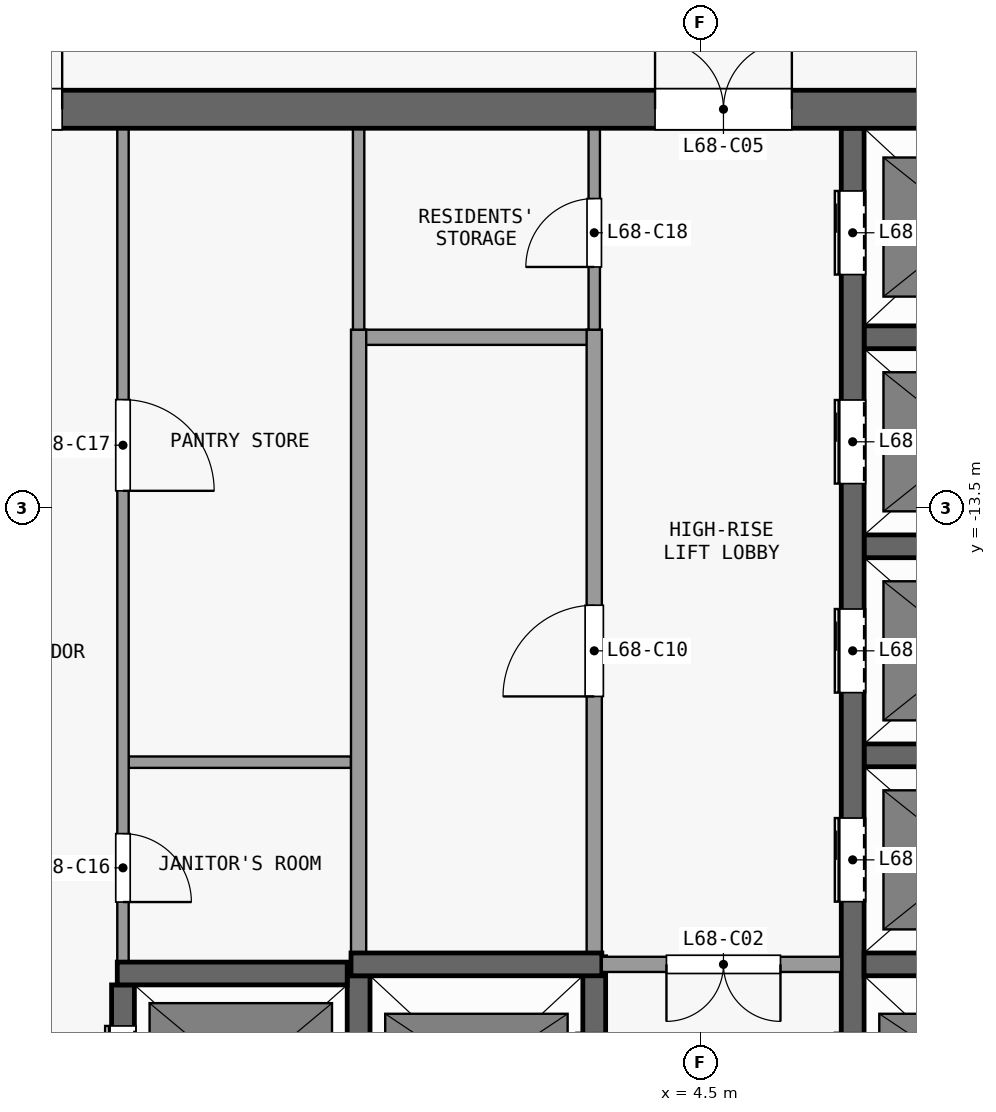
"""IFC4 building model, lengths in metres.
Left out: names, types, materials, properties, quantities, classifications, styles, units other than length and angle.
Written with IfcOpenShell. Run it as: python <this file> out.ifc"""

import sys

from ifc_helpers import new_model, si_unit, direction, frame, frame_2d, origin, place, context, subcontext, project, spatial, rectangle, extrude, element, fill, save


model = new_model("IFC4")
c1 = context("Model", 3, precision=1e-05, world=origin(), true_north=direction((0.0, 1.0)))
c2 = subcontext(c1, "Body", "Model", "MODEL_VIEW")
j1 = project(units=[si_unit("LENGTHUNIT", "METRE"), si_unit("PLANEANGLEUNIT", "RADIAN")], contexts=[c1])
p1 = place(None, origin())
s1 = spatial("IfcSite", under=j1, at=p1, CompositionType="ELEMENT")
p2 = place(p1, origin())
s2 = spatial("IfcBuilding", under=s1, at=p2, CompositionType="ELEMENT")
p3 = place(p2, frame((0.0, 0.0, 269.9)))
s3 = spatial("IfcBuildingStorey", under=s2, at=p3, CompositionType="ELEMENT", Elevation=269.9)
p4 = place(p3, frame((-13.1, -8.25, 0.0), z_axis=(0.0, 0.0, 1.0), x_axis=(1.0, 0.0, 0.0)))
e1 = element("IfcWall", 1, at=p4, inside=s3, PredefinedType="SHEAR", context=c2, shape_type="SweptSolid", body=[
    extrude(rectangle(XDim=26.2, YDim=0.5, at=frame_2d((13.1, 0.0))), origin(), (0.0, 0.0, 1.0), 3.3),
])
p5 = place(p4, frame((7.4, 0.0, 0.0)))
e2 = element("IfcOpeningElement", 2, at=p5, cuts=e1, PredefinedType="OPENING", context=c2, shape_type="SweptSolid", body=[
    extrude(rectangle(XDim=1.8, YDim=2.1, at=frame_2d((0.9, 1.05))), frame((0.0, 0.26, 0.0), z_axis=(0.0, -1.0, 0.0), x_axis=(1.0, 0.0, 0.0)), (0.0, 0.0, 1.0), 0.52),
])
p6 = place(p4, frame((17.0, 0.0, 0.0)))
e3 = element("IfcOpeningElement", 3, at=p6, cuts=e1, PredefinedType="OPENING", context=c2, shape_type="SweptSolid", body=[
    extrude(rectangle(XDim=1.8, YDim=2.1, at=frame_2d((0.9, 1.05))), frame((0.0, 0.26, 0.0), z_axis=(0.0, -1.0, 0.0), x_axis=(1.0, 0.0, 0.0)), (0.0, 0.0, 1.0), 0.52),
])
p7 = place(p4, frame((2.325, 0.0, 0.0)))
e4 = element("IfcOpeningElement", 4, at=p7, cuts=e1, PredefinedType="OPENING", context=c2, shape_type="SweptSolid", body=[
    extrude(rectangle(XDim=0.9, YDim=2.1, at=frame_2d((0.45, 1.05))), frame((0.0, 0.26, 0.0), z_axis=(0.0, -1.0, 0.0), x_axis=(1.0, 0.0, 0.0)), (0.0, 0.0, 1.0), 0.52),
])
p8 = place(p4, frame((22.975, 0.0, 0.0)))
e5 = element("IfcOpeningElement", 5, at=p8, cuts=e1, PredefinedType="OPENING", context=c2, shape_type="SweptSolid", body=[
    extrude(rectangle(XDim=0.9, YDim=2.1, at=frame_2d((0.45, 1.05))), frame((0.0, 0.26, 0.0), z_axis=(0.0, -1.0, 0.0), x_axis=(1.0, 0.0, 0.0)), (0.0, 0.0, 1.0), 0.52),
])
p9 = place(p3, frame((-3.175, -19.62, 0.0), z_axis=(0.0, 0.0, 1.0), x_axis=(1.0, 0.0, 0.0)))
e6 = element("IfcWall", 6, at=p9, inside=s3, PredefinedType="SHEAR", context=c2, shape_type="SweptSolid", body=[
    extrude(rectangle(XDim=3.025, YDim=0.3, at=frame_2d((1.513, 0.0))), origin(), (0.0, 0.0, 1.0), 3.3),
])
p10 = place(p3, frame((-0.1, -19.5, 0.0), z_axis=(0.0, 0.0, 1.0), x_axis=(1.0, 0.0, 0.0)))
e7 = element("IfcWall", 7, at=p10, inside=s3, PredefinedType="SHEAR", context=c2, shape_type="SweptSolid", body=[
    extrude(rectangle(XDim=3.3, YDim=0.3, at=frame_2d((1.65, 0.0))), origin(), (0.0, 0.0, 1.0), 3.3),
])
p11 = place(p3, frame((6.35, -19.5, 0.0), z_axis=(0.0, 0.0, 1.0), x_axis=(-1.0, 0.0, 0.0)))
e8 = element("IfcWall", 8, at=p11, inside=s3, PredefinedType="PARTITIONING", context=c2, shape_type="SweptSolid", body=[
    extrude(rectangle(XDim=3.15, YDim=0.2, at=frame_2d((1.575, 0.0))), origin(), (0.0, 0.0, 1.0), 3.3),
])
p12 = place(p11, frame((0.8, 0.0, 0.0)))
e9 = element("IfcOpeningElement", 9, at=p12, cuts=e8, PredefinedType="OPENING", context=c2, shape_type="SweptSolid", body=[
    extrude(rectangle(XDim=1.5, YDim=2.1, at=frame_2d((0.75, 1.05))), frame((0.0, 0.11, 0.0), z_axis=(0.0, -1.0, 0.0), x_axis=(1.0, 0.0, 0.0)), (0.0, 0.0, 1.0), 0.22),
])
p13 = place(p3, frame((6.65, -19.5, 0.0), z_axis=(0.0, 0.0, 1.0), x_axis=(1.0, 0.0, 0.0)))
e10 = element("IfcWall", 10, at=p13, inside=s3, PredefinedType="SHEAR", context=c2, shape_type="SweptSolid", body=[
    extrude(rectangle(XDim=2.8, YDim=0.3, at=frame_2d((1.4, 0.0))), origin(), (0.0, 0.0, 1.0), 3.3),
])
p14 = place(p3, frame((-3.025, -16.84, 0.0), z_axis=(0.0, 0.0, 1.0), x_axis=(1.0, 0.0, 0.0)))
e11 = element("IfcWall", 11, at=p14, inside=s3, PredefinedType="PARTITIONING", context=c2, shape_type="SweptSolid", body=[
    extrude(rectangle(XDim=2.925, YDim=0.15, at=frame_2d((1.462, 0.0))), origin(), (0.0, 0.0, 1.0), 3.3),
])
for number, where, z_axis, x_axis in (
    (12, (6.65, -16.75, 0.0), (0.0, 0.0, 1.0), (1.0, 0.0, 0.0)),
    (13, (6.65, -14.0, 0.0), (0.0, 0.0, 1.0), (1.0, 0.0, 0.0)),
):
    element("IfcWall", number, at=place(p3, frame(where, z_axis=z_axis, x_axis=x_axis)), inside=s3, PredefinedType="SHEAR", context=c2, shape_type="SweptSolid", body=[
        extrude(rectangle(XDim=2.8, YDim=0.3, at=frame_2d((1.4, 0.0))), origin(), (0.0, 0.0, 1.0), 3.3),
    ])
p15 = place(p3, frame((-0.075, -11.25, 0.0), z_axis=(0.0, 0.0, 1.0), x_axis=(1.0, 0.0, 0.0)))
e14 = element("IfcWall", 14, at=p15, inside=s3, PredefinedType="PARTITIONING", context=c2, shape_type="SweptSolid", body=[
    extrude(rectangle(XDim=3.25, YDim=0.2, at=frame_2d((1.625, 0.0))), origin(), (0.0, 0.0, 1.0), 3.3),
])
p16 = place(p3, frame((6.65, -11.25, 0.0), z_axis=(0.0, 0.0, 1.0), x_axis=(1.0, 0.0, 0.0)))
e15 = element("IfcWall", 15, at=p16, inside=s3, PredefinedType="SHEAR", context=c2, shape_type="SweptSolid", body=[
    extrude(rectangle(XDim=2.8, YDim=0.3, at=frame_2d((1.4, 0.0))), origin(), (0.0, 0.0, 1.0), 3.3),
])
p17 = place(p3, frame((-3.1, -22.25, 0.0), z_axis=(0.0, 0.0, 1.0), x_axis=(0.0, 1.0, 0.0)))
e16 = element("IfcWall", 16, at=p17, inside=s3, PredefinedType="SHEAR", context=c2, shape_type="SweptSolid", body=[
    extrude(rectangle(XDim=2.48, YDim=0.3, at=frame_2d((1.24, 0.0))), origin(), (0.0, 0.0, 1.0), 3.3),
])
p18 = place(p17, frame((0.54, 0.0, 0.0)))
e17 = element("IfcOpeningElement", 17, at=p18, cuts=e16, PredefinedType="OPENING", context=c2, shape_type="SweptSolid", body=[
    extrude(rectangle(XDim=1.4, YDim=2.1, at=frame_2d((0.7, 1.05))), frame((0.0, 0.16, 0.0), z_axis=(0.0, -1.0, 0.0), x_axis=(1.0, 0.0, 0.0)), (0.0, 0.0, 1.0), 0.32),
])
p19 = place(p3, frame((-3.1, -8.5, 0.0), z_axis=(0.0, 0.0, 1.0), x_axis=(0.0, -1.0, 0.0)))
e18 = element("IfcWall", 18, at=p19, inside=s3, PredefinedType="PARTITIONING", context=c2, shape_type="SweptSolid", body=[
    extrude(rectangle(XDim=10.97, YDim=0.15, at=frame_2d((5.485, 0.0))), origin(), (0.0, 0.0, 1.0), 3.3),
])
p20 = place(p19, frame((9.28, 0.0, 0.0)))
e19 = element("IfcOpeningElement", 19, at=p20, cuts=e18, PredefinedType="OPENING", context=c2, shape_type="SweptSolid", body=[
    extrude(rectangle(XDim=0.9, YDim=2.1, at=frame_2d((0.45, 1.05))), frame((0.0, 0.085, 0.0), z_axis=(0.0, -1.0, 0.0), x_axis=(1.0, 0.0, 0.0)), (0.0, 0.0, 1.0), 0.17),
])
p21 = place(p19, frame((3.57, 0.0, 0.0)))
e20 = element("IfcOpeningElement", 20, at=p21, cuts=e18, PredefinedType="OPENING", context=c2, shape_type="SweptSolid", body=[
    extrude(rectangle(XDim=1.2, YDim=2.1, at=frame_2d((0.6, 1.05))), frame((0.0, 0.085, 0.0), z_axis=(0.0, -1.0, 0.0), x_axis=(1.0, 0.0, 0.0)), (0.0, 0.0, 1.0), 0.17),
])
p22 = place(p3, frame((0.0, -22.25, 0.0), z_axis=(0.0, 0.0, 1.0), x_axis=(0.0, 1.0, 0.0)))
e21 = element("IfcWall", 21, at=p22, inside=s3, PredefinedType="SHEAR", context=c2, shape_type="SweptSolid", body=[
    extrude(rectangle(XDim=2.6, YDim=0.3, at=frame_2d((1.3, 0.0))), origin(), (0.0, 0.0, 1.0), 3.3),
])
p23 = place(p3, frame((0.0, -19.35, 0.0), z_axis=(0.0, 0.0, 1.0), x_axis=(0.0, 1.0, 0.0)))
e22 = element("IfcWall", 22, at=p23, inside=s3, PredefinedType="PARTITIONING", context=c2, shape_type="SweptSolid", body=[
    extrude(rectangle(XDim=8.2, YDim=0.2, at=frame_2d((4.1, 0.0))), origin(), (0.0, 0.0, 1.0), 3.3),
])
p24 = place(p3, frame((0.0, -11.15, 0.0), z_axis=(0.0, 0.0, 1.0), x_axis=(0.0, 1.0, 0.0)))
e23 = element("IfcWall", 23, at=p24, inside=s3, PredefinedType="PARTITIONING", context=c2, shape_type="SweptSolid", body=[
    extrude(rectangle(XDim=2.65, YDim=0.15, at=frame_2d((1.325, 0.0))), origin(), (0.0, 0.0, 1.0), 3.3),
])
p25 = place(p3, frame((3.1, -22.25, 0.0), z_axis=(0.0, 0.0, 1.0), x_axis=(0.0, 1.0, 0.0)))
e24 = element("IfcWall", 24, at=p25, inside=s3, PredefinedType="SHEAR", context=c2, shape_type="SweptSolid", body=[
    extrude(rectangle(XDim=2.85, YDim=0.3, at=frame_2d((1.425, 0.0))), origin(), (0.0, 0.0, 1.0), 3.3),
])
p26 = place(p25, frame((0.75, 0.0, 0.0)))
e25 = element("IfcOpeningElement", 25, at=p26, cuts=e24, PredefinedType="OPENING", context=c2, shape_type="SweptSolid", body=[
    extrude(rectangle(XDim=1.1, YDim=2.1, at=frame_2d((0.55, 1.05))), frame((0.0, 0.16, 0.0), z_axis=(0.0, -1.0, 0.0), x_axis=(1.0, 0.0, 0.0)), (0.0, 0.0, 1.0), 0.32),
])
p27 = place(p3, frame((3.1, -19.6, 0.0), z_axis=(0.0, 0.0, 1.0), x_axis=(0.0, 1.0, 0.0)))
e26 = element("IfcWall", 26, at=p27, inside=s3, PredefinedType="PARTITIONING", context=c2, shape_type="SweptSolid", body=[
    extrude(rectangle(XDim=8.45, YDim=0.2, at=frame_2d((4.225, 0.0))), origin(), (0.0, 0.0, 1.0), 3.3),
])
p28 = place(p27, frame((3.625, 0.0, 0.0)))
e27 = element("IfcOpeningElement", 27, at=p28, cuts=e26, PredefinedType="OPENING", context=c2, shape_type="SweptSolid", body=[
    extrude(rectangle(XDim=1.2, YDim=2.1, at=frame_2d((0.6, 1.05))), frame((0.0, 0.11, 0.0), z_axis=(0.0, -1.0, 0.0), x_axis=(1.0, 0.0, 0.0)), (0.0, 0.0, 1.0), 0.22),
])
p29 = place(p3, frame((3.1, -11.15, 0.0), z_axis=(0.0, 0.0, 1.0), x_axis=(0.0, 1.0, 0.0)))
e28 = element("IfcWall", 28, at=p29, inside=s3, PredefinedType="PARTITIONING", context=c2, shape_type="SweptSolid", body=[
    extrude(rectangle(XDim=2.65, YDim=0.15, at=frame_2d((1.325, 0.0))), origin(), (0.0, 0.0, 1.0), 3.3),
])
p30 = place(p29, frame((0.825, 0.0, 0.0)))
e29 = element("IfcOpeningElement", 29, at=p30, cuts=e28, PredefinedType="OPENING", context=c2, shape_type="SweptSolid", body=[
    extrude(rectangle(XDim=0.9, YDim=2.1, at=frame_2d((0.45, 1.05))), frame((0.0, 0.085, 0.0), z_axis=(0.0, -1.0, 0.0), x_axis=(1.0, 0.0, 0.0)), (0.0, 0.0, 1.0), 0.17),
])
p31 = place(p3, frame((6.5, -22.55, 0.0), z_axis=(0.0, 0.0, 1.0), x_axis=(0.0, 1.0, 0.0)))
e30 = element("IfcWall", 30, at=p31, inside=s3, PredefinedType="SHEAR", context=c2, shape_type="SweptSolid", body=[
    extrude(rectangle(XDim=14.05, YDim=0.3, at=frame_2d((7.025, 0.0))), origin(), (0.0, 0.0, 1.0), 3.3),
])
p32 = place(p31, frame((1.05, 0.0, 0.0)))
e31 = element("IfcOpeningElement", 31, at=p32, cuts=e30, PredefinedType="OPENING", context=c2, shape_type="SweptSolid", body=[
    extrude(rectangle(XDim=1.1, YDim=2.1, at=frame_2d((0.55, 1.05))), frame((0.0, 0.16, 0.0), z_axis=(0.0, -1.0, 0.0), x_axis=(1.0, 0.0, 0.0)), (0.0, 0.0, 1.0), 0.32),
])
p33 = place(p31, frame((3.875, 0.0, 0.0)))
e32 = element("IfcOpeningElement", 32, at=p33, cuts=e30, PredefinedType="OPENING", context=c2, shape_type="SweptSolid", body=[
    extrude(rectangle(XDim=1.1, YDim=2.1, at=frame_2d((0.55, 1.05))), frame((0.0, 0.16, 0.0), z_axis=(0.0, -1.0, 0.0), x_axis=(1.0, 0.0, 0.0)), (0.0, 0.0, 1.0), 0.32),
])
p34 = place(p31, frame((6.625, 0.0, 0.0)))
e33 = element("IfcOpeningElement", 33, at=p34, cuts=e30, PredefinedType="OPENING", context=c2, shape_type="SweptSolid", body=[
    extrude(rectangle(XDim=1.1, YDim=2.1, at=frame_2d((0.55, 1.05))), frame((0.0, 0.16, 0.0), z_axis=(0.0, -1.0, 0.0), x_axis=(1.0, 0.0, 0.0)), (0.0, 0.0, 1.0), 0.32),
])
p35 = place(p31, frame((9.375, 0.0, 0.0)))
e34 = element("IfcOpeningElement", 34, at=p35, cuts=e30, PredefinedType="OPENING", context=c2, shape_type="SweptSolid", body=[
    extrude(rectangle(XDim=1.1, YDim=2.1, at=frame_2d((0.55, 1.05))), frame((0.0, 0.16, 0.0), z_axis=(0.0, -1.0, 0.0), x_axis=(1.0, 0.0, 0.0)), (0.0, 0.0, 1.0), 0.32),
])
p36 = place(p31, frame((12.125, 0.0, 0.0)))
e35 = element("IfcOpeningElement", 35, at=p36, cuts=e30, PredefinedType="OPENING", context=c2, shape_type="SweptSolid", body=[
    extrude(rectangle(XDim=1.1, YDim=2.1, at=frame_2d((0.55, 1.05))), frame((0.0, 0.16, 0.0), z_axis=(0.0, -1.0, 0.0), x_axis=(1.0, 0.0, 0.0)), (0.0, 0.0, 1.0), 0.32),
])
p37 = place(p33, origin())
e36 = element("IfcDoor", 36, at=p37, inside=s3, OperationType="DOUBLE_DOOR_SLIDING", PredefinedType="DOOR", context=c2, shape_type="SweptSolid", body=[
    extrude(rectangle(XDim=1.1, YDim=2.1, at=frame_2d((0.55, 1.05))), frame((0.0, 0.025, 0.0), z_axis=(0.0, -1.0, 0.0), x_axis=(1.0, 0.0, 0.0)), (0.0, 0.0, 1.0), 0.05),
])
fill(e32, e36)
p38 = place(p34, origin())
e37 = element("IfcDoor", 37, at=p38, inside=s3, OperationType="DOUBLE_DOOR_SLIDING", PredefinedType="DOOR", context=c2, shape_type="SweptSolid", body=[
    extrude(rectangle(XDim=1.1, YDim=2.1, at=frame_2d((0.55, 1.05))), frame((0.0, 0.025, 0.0), z_axis=(0.0, -1.0, 0.0), x_axis=(1.0, 0.0, 0.0)), (0.0, 0.0, 1.0), 0.05),
])
fill(e33, e37)
p39 = place(p35, origin())
e38 = element("IfcDoor", 38, at=p39, inside=s3, OperationType="DOUBLE_DOOR_SLIDING", PredefinedType="DOOR", context=c2, shape_type="SweptSolid", body=[
    extrude(rectangle(XDim=1.1, YDim=2.1, at=frame_2d((0.55, 1.05))), frame((0.0, 0.025, 0.0), z_axis=(0.0, -1.0, 0.0), x_axis=(1.0, 0.0, 0.0)), (0.0, 0.0, 1.0), 0.05),
])
fill(e34, e38)
p40 = place(p36, origin())
e39 = element("IfcDoor", 39, at=p40, inside=s3, OperationType="DOUBLE_DOOR_SLIDING", PredefinedType="DOOR", context=c2, shape_type="SweptSolid", body=[
    extrude(rectangle(XDim=1.1, YDim=2.1, at=frame_2d((0.55, 1.05))), frame((0.0, 0.025, 0.0), z_axis=(0.0, -1.0, 0.0), x_axis=(1.0, 0.0, 0.0)), (0.0, 0.0, 1.0), 0.05),
])
fill(e35, e39)
p41 = place(p18, origin())
e40 = element("IfcDoor", 40, at=p41, inside=s3, OperationType="DOUBLE_DOOR_SLIDING", PredefinedType="DOOR", context=c2, shape_type="SweptSolid", body=[
    extrude(rectangle(XDim=1.4, YDim=2.1, at=frame_2d((0.7, 1.05))), frame((0.0, 0.025, 0.0), z_axis=(0.0, -1.0, 0.0), x_axis=(1.0, 0.0, 0.0)), (0.0, 0.0, 1.0), 0.05),
])
fill(e17, e40)
p42 = place(p12, origin())
e41 = element("IfcDoor", 41, at=p42, inside=s3, OperationType="DOUBLE_DOOR_SINGLE_SWING", PredefinedType="DOOR", context=c2, shape_type="SweptSolid", body=[
    extrude(rectangle(XDim=1.5, YDim=2.1, at=frame_2d((0.75, 1.05))), frame((0.0, 0.025, 0.0), z_axis=(0.0, -1.0, 0.0), x_axis=(1.0, 0.0, 0.0)), (0.0, 0.0, 1.0), 0.05),
])
fill(e9, e41)
p43 = place(p5, origin())
e42 = element("IfcDoor", 42, at=p43, inside=s3, OperationType="DOUBLE_DOOR_SINGLE_SWING", PredefinedType="DOOR", context=c2, shape_type="SweptSolid", body=[
    extrude(rectangle(XDim=1.8, YDim=2.1, at=frame_2d((0.9, 1.05))), frame((0.0, 0.025, 0.0), z_axis=(0.0, -1.0, 0.0), x_axis=(1.0, 0.0, 0.0)), (0.0, 0.0, 1.0), 0.05),
])
fill(e2, e42)
p44 = place(p6, origin())
e43 = element("IfcDoor", 43, at=p44, inside=s3, OperationType="DOUBLE_DOOR_SINGLE_SWING", PredefinedType="DOOR", context=c2, shape_type="SweptSolid", body=[
    extrude(rectangle(XDim=1.8, YDim=2.1, at=frame_2d((0.9, 1.05))), frame((0.0, 0.025, 0.0), z_axis=(0.0, -1.0, 0.0), x_axis=(1.0, 0.0, 0.0)), (0.0, 0.0, 1.0), 0.05),
])
fill(e3, e43)
p45 = place(p28, origin())
e44 = element("IfcDoor", 44, at=p45, inside=s3, OperationType="SINGLE_SWING_LEFT", PredefinedType="DOOR", context=c2, shape_type="SweptSolid", body=[
    extrude(rectangle(XDim=1.2, YDim=2.1, at=frame_2d((0.6, 1.05))), frame((0.0, 0.025, 0.0), z_axis=(0.0, -1.0, 0.0), x_axis=(1.0, 0.0, 0.0)), (0.0, 0.0, 1.0), 0.05),
])
fill(e27, e44)
p46 = place(p20, origin())
e45 = element("IfcDoor", 45, at=p46, inside=s3, OperationType="SINGLE_SWING_RIGHT", PredefinedType="DOOR", context=c2, shape_type="SweptSolid", body=[
    extrude(rectangle(XDim=0.9, YDim=2.1, at=frame_2d((0.45, 1.05))), frame((0.0, 0.025, 0.0), z_axis=(0.0, -1.0, 0.0), x_axis=(1.0, 0.0, 0.0)), (0.0, 0.0, 1.0), 0.05),
])
fill(e19, e45)
p47 = place(p21, origin())
e46 = element("IfcDoor", 46, at=p47, inside=s3, OperationType="SINGLE_SWING_RIGHT", PredefinedType="DOOR", context=c2, shape_type="SweptSolid", body=[
    extrude(rectangle(XDim=1.2, YDim=2.1, at=frame_2d((0.6, 1.05))), frame((0.0, 0.025, 0.0), z_axis=(0.0, -1.0, 0.0), x_axis=(1.0, 0.0, 0.0)), (0.0, 0.0, 1.0), 0.05),
])
fill(e20, e46)
p48 = place(p30, origin())
e47 = element("IfcDoor", 47, at=p48, inside=s3, OperationType="SINGLE_SWING_LEFT", PredefinedType="DOOR", context=c2, shape_type="SweptSolid", body=[
    extrude(rectangle(XDim=0.9, YDim=2.1, at=frame_2d((0.45, 1.05))), frame((0.0, 0.025, 0.0), z_axis=(0.0, -1.0, 0.0), x_axis=(1.0, 0.0, 0.0)), (0.0, 0.0, 1.0), 0.05),
])
fill(e29, e47)
save(model, sys.argv[1])
